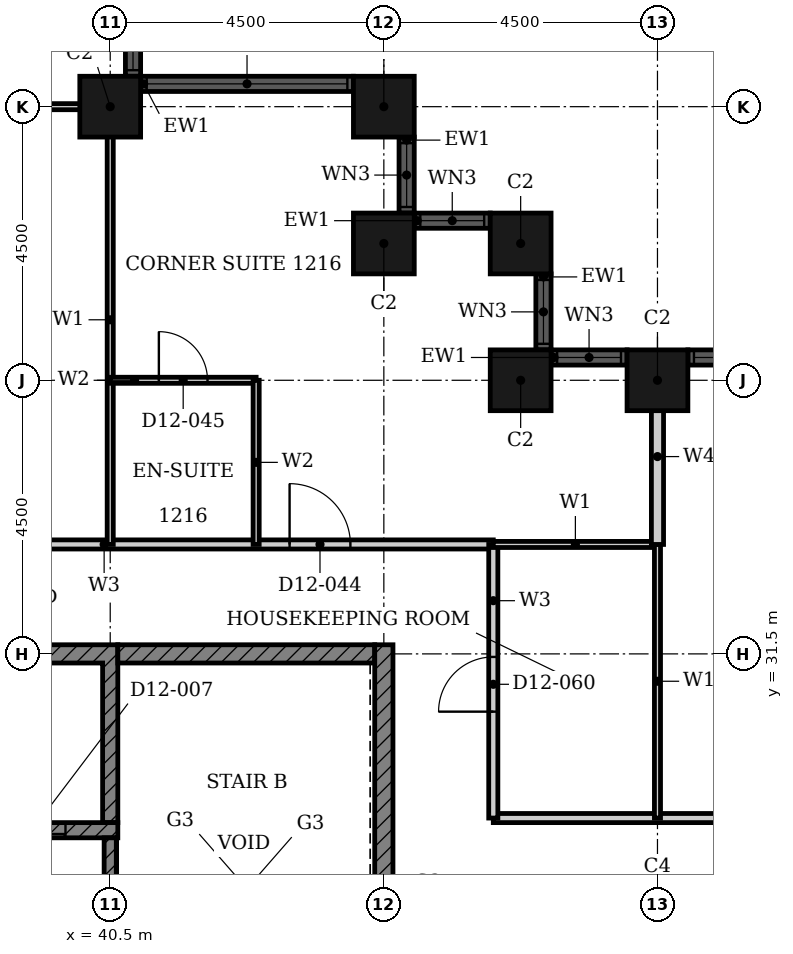
"""IFC4 building model, lengths in metres.
Left out: names, types, materials, properties, quantities, classifications, styles, units other than length and angle.
Written with IfcOpenShell. Run it as: python <this file> out.ifc"""

import sys

from ifc_helpers import new_model, si_unit, direction, frame, frame_2d, origin, origin_2d, place, context, subcontext, project, spatial, polyline, rectangle, hollow_rectangle, outline, extrude, element, fill, save


model = new_model("IFC4")
c1 = context("Model", 3, precision=1e-05, world=origin(), true_north=direction((0.0, 1.0)))
c2 = subcontext(c1, "Body", "Model", "MODEL_VIEW")
j1 = project(units=[si_unit("LENGTHUNIT", "METRE"), si_unit("PLANEANGLEUNIT", "RADIAN")], contexts=[c1])
p1 = place(None, origin())
s1 = spatial("IfcSite", under=j1, at=p1, CompositionType="ELEMENT")
p2 = place(p1, origin())
s2 = spatial("IfcBuilding", under=s1, at=p2, CompositionType="ELEMENT")
p3 = place(p2, frame((0.0, 0.0, 56.4)))
s3 = spatial("IfcBuildingStorey", under=s2, at=p3, CompositionType="ELEMENT", Elevation=56.4)
for number, where, z_axis, x_axis in (
    (1, (49.5, 36.0, 0.0), (0.0, 0.0, 1.0), (1.0, 0.0, 0.0)),
    (2, (47.25, 36.0, 0.0), (0.0, 0.0, 1.0), (1.0, 0.0, 0.0)),
    (3, (47.25, 38.25, 0.0), (0.0, 0.0, 1.0), (1.0, 0.0, 0.0)),
    (4, (45.0, 38.25, 0.0), (0.0, 0.0, 1.0), (1.0, 0.0, 0.0)),
    (5, (45.0, 40.5, 0.0), (0.0, 0.0, 1.0), (1.0, 0.0, 0.0)),
    (6, (40.5, 40.5, 0.0), (0.0, 0.0, 1.0), (1.0, 0.0, 0.0)),
):
    element("IfcColumn", number, at=place(p3, frame(where, z_axis=z_axis, x_axis=x_axis)), inside=s3, PredefinedType="COLUMN", context=c2, shape_type="SweptSolid", body=[
        extrude(hollow_rectangle(XDim=1.0, YDim=1.0, WallThickness=0.032, at=origin_2d()), origin(), (0.0, 0.0, 1.0), 3.6),
    ])
p4 = place(p3, frame((58.0, 36.375, 0.0), z_axis=(0.0, 0.0, 1.0), x_axis=(-1.0, 0.0, 0.0)))
e7 = element("IfcWall", 7, at=p4, inside=s3, PredefinedType="SOLIDWALL", context=c2, shape_type="SweptSolid", body=[
    extrude(rectangle(XDim=8.0, YDim=0.25, at=frame_2d((4.0, 0.0))), origin(), (0.0, 0.0, 1.0), 3.6),
])
p5 = place(p4, frame((0.1, 0.0, 0.9)))
e8 = element("IfcOpeningElement", 8, at=p5, cuts=e7, PredefinedType="OPENING", context=c2, shape_type="SweptSolid", body=[
    extrude(rectangle(XDim=3.3, YDim=2.08, at=frame_2d((1.65, 1.04))), frame((0.0, 0.135, 0.0), z_axis=(0.0, -1.0, 0.0), x_axis=(1.0, 0.0, 0.0)), (0.0, 0.0, 1.0), 0.27),
])
p6 = place(p4, frame((4.6, 0.0, 0.9)))
e9 = element("IfcOpeningElement", 9, at=p6, cuts=e7, PredefinedType="OPENING", context=c2, shape_type="SweptSolid", body=[
    extrude(rectangle(XDim=3.3, YDim=2.08, at=frame_2d((1.65, 1.04))), frame((0.0, 0.135, 0.0), z_axis=(0.0, -1.0, 0.0), x_axis=(1.0, 0.0, 0.0)), (0.0, 0.0, 1.0), 0.27),
])
p7 = place(p3, frame((49.0, 36.375, 0.0), z_axis=(0.0, 0.0, 1.0), x_axis=(-1.0, 0.0, 0.0)))
e10 = element("IfcWall", 10, at=p7, inside=s3, PredefinedType="SOLIDWALL", context=c2, shape_type="SweptSolid", body=[
    extrude(rectangle(XDim=1.25, YDim=0.25, at=frame_2d((0.625, 0.0))), origin(), (0.0, 0.0, 1.0), 3.6),
])
p8 = place(p7, frame((0.1, 0.0, 0.9)))
e11 = element("IfcOpeningElement", 11, at=p8, cuts=e10, PredefinedType="OPENING", context=c2, shape_type="SweptSolid", body=[
    extrude(rectangle(XDim=1.05, YDim=2.08, at=frame_2d((0.525, 1.04))), frame((0.0, 0.135, 0.0), z_axis=(0.0, -1.0, 0.0), x_axis=(1.0, 0.0, 0.0)), (0.0, 0.0, 1.0), 0.27),
])
p9 = place(p3, frame((47.625, 36.5, 0.0), z_axis=(0.0, 0.0, 1.0), x_axis=(0.0, 1.0, 0.0)))
e12 = element("IfcWall", 12, at=p9, inside=s3, PredefinedType="SOLIDWALL", context=c2, shape_type="SweptSolid", body=[
    extrude(rectangle(XDim=1.25, YDim=0.25, at=frame_2d((0.625, 0.0))), origin(), (0.0, 0.0, 1.0), 3.6),
])
p10 = place(p9, frame((0.1, 0.0, 0.9)))
e13 = element("IfcOpeningElement", 13, at=p10, cuts=e12, PredefinedType="OPENING", context=c2, shape_type="SweptSolid", body=[
    extrude(rectangle(XDim=1.05, YDim=2.08, at=frame_2d((0.525, 1.04))), frame((0.0, 0.135, 0.0), z_axis=(0.0, -1.0, 0.0), x_axis=(1.0, 0.0, 0.0)), (0.0, 0.0, 1.0), 0.27),
])
p11 = place(p3, frame((46.75, 38.625, 0.0), z_axis=(0.0, 0.0, 1.0), x_axis=(-1.0, 0.0, 0.0)))
e14 = element("IfcWall", 14, at=p11, inside=s3, PredefinedType="SOLIDWALL", context=c2, shape_type="SweptSolid", body=[
    extrude(rectangle(XDim=1.25, YDim=0.25, at=frame_2d((0.625, 0.0))), origin(), (0.0, 0.0, 1.0), 3.6),
])
p12 = place(p11, frame((0.1, 0.0, 0.9)))
e15 = element("IfcOpeningElement", 15, at=p12, cuts=e14, PredefinedType="OPENING", context=c2, shape_type="SweptSolid", body=[
    extrude(rectangle(XDim=1.05, YDim=2.08, at=frame_2d((0.525, 1.04))), frame((0.0, 0.135, 0.0), z_axis=(0.0, -1.0, 0.0), x_axis=(1.0, 0.0, 0.0)), (0.0, 0.0, 1.0), 0.27),
])
p13 = place(p3, frame((45.375, 38.75, 0.0), z_axis=(0.0, 0.0, 1.0), x_axis=(0.0, 1.0, 0.0)))
e16 = element("IfcWall", 16, at=p13, inside=s3, PredefinedType="SOLIDWALL", context=c2, shape_type="SweptSolid", body=[
    extrude(rectangle(XDim=1.25, YDim=0.25, at=frame_2d((0.625, 0.0))), origin(), (0.0, 0.0, 1.0), 3.6),
])
p14 = place(p13, frame((0.1, 0.0, 0.9)))
e17 = element("IfcOpeningElement", 17, at=p14, cuts=e16, PredefinedType="OPENING", context=c2, shape_type="SweptSolid", body=[
    extrude(rectangle(XDim=1.05, YDim=2.08, at=frame_2d((0.525, 1.04))), frame((0.0, 0.135, 0.0), z_axis=(0.0, -1.0, 0.0), x_axis=(1.0, 0.0, 0.0)), (0.0, 0.0, 1.0), 0.27),
])
p15 = place(p3, frame((44.5, 40.875, 0.0), z_axis=(0.0, 0.0, 1.0), x_axis=(-1.0, 0.0, 0.0)))
e18 = element("IfcWall", 18, at=p15, inside=s3, PredefinedType="SOLIDWALL", context=c2, shape_type="SweptSolid", body=[
    extrude(rectangle(XDim=3.5, YDim=0.25, at=frame_2d((1.75, 0.0))), origin(), (0.0, 0.0, 1.0), 3.6),
])
p16 = place(p15, frame((0.1, 0.0, 0.9)))
e19 = element("IfcOpeningElement", 19, at=p16, cuts=e18, PredefinedType="OPENING", context=c2, shape_type="SweptSolid", body=[
    extrude(rectangle(XDim=3.3, YDim=2.08, at=frame_2d((1.65, 1.04))), frame((0.0, 0.135, 0.0), z_axis=(0.0, -1.0, 0.0), x_axis=(1.0, 0.0, 0.0)), (0.0, 0.0, 1.0), 0.27),
])
p17 = place(p3, frame((40.875, 41.0, 0.0), z_axis=(0.0, 0.0, 1.0), x_axis=(0.0, 1.0, 0.0)))
e20 = element("IfcWall", 20, at=p17, inside=s3, PredefinedType="SOLIDWALL", context=c2, shape_type="SweptSolid", body=[
    extrude(rectangle(XDim=8.0, YDim=0.25, at=frame_2d((4.0, 0.0))), origin(), (0.0, 0.0, 1.0), 3.6),
])
p18 = place(p17, frame((0.1, 0.0, 0.9)))
e21 = element("IfcOpeningElement", 21, at=p18, cuts=e20, PredefinedType="OPENING", context=c2, shape_type="SweptSolid", body=[
    extrude(rectangle(XDim=3.3, YDim=2.08, at=frame_2d((1.65, 1.04))), frame((0.0, 0.135, 0.0), z_axis=(0.0, -1.0, 0.0), x_axis=(1.0, 0.0, 0.0)), (0.0, 0.0, 1.0), 0.27),
])
p19 = place(p17, frame((4.6, 0.0, 0.9)))
e22 = element("IfcOpeningElement", 22, at=p19, cuts=e20, PredefinedType="OPENING", context=c2, shape_type="SweptSolid", body=[
    extrude(rectangle(XDim=3.3, YDim=2.08, at=frame_2d((1.65, 1.04))), frame((0.0, 0.135, 0.0), z_axis=(0.0, -1.0, 0.0), x_axis=(1.0, 0.0, 0.0)), (0.0, 0.0, 1.0), 0.27),
])
p20 = place(p3, origin())
e23 = element("IfcWall", 23, at=p20, inside=s3, PredefinedType="SHEAR", context=c2, shape_type="SweptSolid", body=[
    extrude(outline(polyline([(24.947, 28.725), (25.197, 28.725), (25.197, 31.35), (27.518, 31.35), (27.518, 28.725), (27.768, 28.725), (27.768, 31.35), (30.089, 31.35), (30.089, 28.725), (30.339, 28.725), (30.339, 31.35), (32.661, 31.35), (32.661, 28.725), (32.911, 28.725), (32.911, 31.35), (35.232, 31.35), (35.232, 28.725), (35.482, 28.725), (35.482, 31.35), (37.803, 31.35), (37.803, 28.725), (38.053, 28.725), (38.053, 31.35), (40.375, 31.35), (40.375, 28.725), (40.625, 28.725), (40.625, 31.65), (24.947, 31.65), (24.947, 28.725)])), origin(), (0.0, 0.0, 1.0), 3.3),
])
p21 = place(p3, frame((40.625, 31.5, 0.0), z_axis=(0.0, 0.0, 1.0), x_axis=(1.0, 0.0, 0.0)))
e24 = element("IfcWall", 24, at=p21, inside=s3, PredefinedType="SHEAR", context=c2, shape_type="SweptSolid", body=[
    extrude(rectangle(XDim=4.225, YDim=0.3, at=frame_2d((2.113, 0.0))), origin(), (0.0, 0.0, 1.0), 3.3),
])
p22 = place(p3, frame((45.0, 22.35, 0.0), z_axis=(0.0, 0.0, 1.0), x_axis=(0.0, 1.0, 0.0)))
e25 = element("IfcWall", 25, at=p22, inside=s3, PredefinedType="SHEAR", context=c2, shape_type="SweptSolid", body=[
    extrude(rectangle(XDim=9.3, YDim=0.3, at=frame_2d((4.65, 0.0))), origin(), (0.0, 0.0, 1.0), 3.3),
])
p23 = place(p3, frame((24.947, 28.6, 0.0), z_axis=(0.0, 0.0, 1.0), x_axis=(1.0, 0.0, 0.0)))
e26 = element("IfcWall", 26, at=p23, inside=s3, PredefinedType="SHEAR", context=c2, shape_type="SweptSolid", body=[
    extrude(rectangle(XDim=15.678, YDim=0.25, at=frame_2d((7.839, 0.0))), origin(), (0.0, 0.0, 1.0), 3.3),
])
p24 = place(p23, frame((0.861, 0.0, 0.0)))
e27 = element("IfcOpeningElement", 27, at=p24, cuts=e26, PredefinedType="OPENING", context=c2, shape_type="SweptSolid", body=[
    extrude(rectangle(XDim=1.1, YDim=2.1, at=frame_2d((0.55, 1.05))), frame((0.0, 0.135, 0.0), z_axis=(0.0, -1.0, 0.0), x_axis=(1.0, 0.0, 0.0)), (0.0, 0.0, 1.0), 0.27),
])
p25 = place(p23, frame((8.575, 0.0, 0.0)))
e28 = element("IfcOpeningElement", 28, at=p25, cuts=e26, PredefinedType="OPENING", context=c2, shape_type="SweptSolid", body=[
    extrude(rectangle(XDim=1.1, YDim=2.1, at=frame_2d((0.55, 1.05))), frame((0.0, 0.135, 0.0), z_axis=(0.0, -1.0, 0.0), x_axis=(1.0, 0.0, 0.0)), (0.0, 0.0, 1.0), 0.27),
])
p26 = place(p23, frame((13.718, 0.0, 0.0)))
e29 = element("IfcOpeningElement", 29, at=p26, cuts=e26, PredefinedType="OPENING", context=c2, shape_type="SweptSolid", body=[
    extrude(rectangle(XDim=1.1, YDim=2.1, at=frame_2d((0.55, 1.05))), frame((0.0, 0.135, 0.0), z_axis=(0.0, -1.0, 0.0), x_axis=(1.0, 0.0, 0.0)), (0.0, 0.0, 1.0), 0.27),
])
p27 = place(p3, frame((40.5, 22.65, 0.0), z_axis=(0.0, 0.0, 1.0), x_axis=(0.0, 1.0, 0.0)))
e30 = element("IfcWall", 30, at=p27, inside=s3, PredefinedType="SHEAR", context=c2, shape_type="SweptSolid", body=[
    extrude(rectangle(XDim=5.825, YDim=0.2, at=frame_2d((2.913, 0.0))), origin(), (0.0, 0.0, 1.0), 3.3),
])
p28 = place(p27, frame((0.25, 0.0, 0.0)))
e31 = element("IfcOpeningElement", 31, at=p28, cuts=e30, PredefinedType="OPENING", context=c2, shape_type="SweptSolid", body=[
    extrude(rectangle(XDim=1.8, YDim=2.1, at=frame_2d((0.9, 1.05))), frame((0.0, 0.11, 0.0), z_axis=(0.0, -1.0, 0.0), x_axis=(1.0, 0.0, 0.0)), (0.0, 0.0, 1.0), 0.22),
])
p29 = place(p3, frame((46.8, 28.8, 0.0), z_axis=(0.0, 0.0, 1.0), x_axis=(1.0, 0.0, 0.0)))
e32 = element("IfcWall", 32, at=p29, inside=s3, PredefinedType="PARTITIONING", context=c2, shape_type="SweptSolid", body=[
    extrude(rectangle(XDim=11.7, YDim=0.15, at=frame_2d((5.85, 0.0))), origin(), (0.0, 0.0, 1.0), 3.3),
])
p30 = place(p29, frame((4.45, 0.0, 0.0)))
e33 = element("IfcOpeningElement", 33, at=p30, cuts=e32, PredefinedType="OPENING", context=c2, shape_type="SweptSolid", body=[
    extrude(rectangle(XDim=1.0, YDim=2.1, at=frame_2d((0.5, 1.05))), frame((0.0, 0.085, 0.0), z_axis=(0.0, -1.0, 0.0), x_axis=(1.0, 0.0, 0.0)), (0.0, 0.0, 1.0), 0.17),
])
p31 = place(p3, frame((33.3, 33.3, 0.0), z_axis=(0.0, 0.0, 1.0), x_axis=(1.0, 0.0, 0.0)))
e34 = element("IfcWall", 34, at=p31, inside=s3, PredefinedType="PARTITIONING", context=c2, shape_type="SweptSolid", body=[
    extrude(rectangle(XDim=13.5, YDim=0.15, at=frame_2d((6.75, 0.0))), origin(), (0.0, 0.0, 1.0), 3.3),
])
p32 = place(p31, frame((10.15, 0.0, 0.0)))
e35 = element("IfcOpeningElement", 35, at=p32, cuts=e34, PredefinedType="OPENING", context=c2, shape_type="SweptSolid", body=[
    extrude(rectangle(XDim=1.0, YDim=2.1, at=frame_2d((0.5, 1.05))), frame((0.0, 0.085, 0.0), z_axis=(0.0, -1.0, 0.0), x_axis=(1.0, 0.0, 0.0)), (0.0, 0.0, 1.0), 0.17),
])
p33 = place(p31, frame((3.15, 0.0, 0.0)))
e36 = element("IfcOpeningElement", 36, at=p33, cuts=e34, PredefinedType="OPENING", context=c2, shape_type="SweptSolid", body=[
    extrude(rectangle(XDim=0.9, YDim=2.1, at=frame_2d((0.45, 1.05))), frame((0.0, 0.085, 0.0), z_axis=(0.0, -1.0, 0.0), x_axis=(1.0, 0.0, 0.0)), (0.0, 0.0, 1.0), 0.17),
])
p34 = place(p3, frame((46.8, 28.8, 0.0), z_axis=(0.0, 0.0, 1.0), x_axis=(0.0, 1.0, 0.0)))
e37 = element("IfcWall", 37, at=p34, inside=s3, PredefinedType="PARTITIONING", context=c2, shape_type="SweptSolid", body=[
    extrude(rectangle(XDim=4.5, YDim=0.15, at=frame_2d((2.25, 0.0))), origin(), (0.0, 0.0, 1.0), 3.3),
])
p35 = place(p34, frame((1.75, 0.0, 0.0)))
e38 = element("IfcOpeningElement", 38, at=p35, cuts=e37, PredefinedType="OPENING", context=c2, shape_type="SweptSolid", body=[
    extrude(rectangle(XDim=0.9, YDim=2.1, at=frame_2d((0.45, 1.05))), frame((0.0, 0.085, 0.0), z_axis=(0.0, -1.0, 0.0), x_axis=(1.0, 0.0, 0.0)), (0.0, 0.0, 1.0), 0.17),
])
p36 = place(p3, frame((46.8, 33.3, 0.0), z_axis=(0.0, 0.0, 1.0), x_axis=(1.0, 0.0, 0.0)))
e39 = element("IfcWall", 39, at=p36, inside=s3, PredefinedType="PARTITIONING", context=c2, shape_type="SweptSolid", body=[
    extrude(rectangle(XDim=2.7, YDim=0.1, at=frame_2d((1.35, 0.0))), origin(), (0.0, 0.0, 1.0), 3.3),
])
p37 = place(p3, frame((33.3, 40.5, 0.0), z_axis=(0.0, 0.0, 1.0), x_axis=(1.0, 0.0, 0.0)))
e40 = element("IfcWall", 40, at=p37, inside=s3, PredefinedType="PARTITIONING", context=c2, shape_type="SweptSolid", body=[
    extrude(rectangle(XDim=7.39, YDim=0.1, at=frame_2d((3.695, 0.0))), origin(), (0.0, 0.0, 1.0), 2.38),
])
p38 = place(p3, frame((40.5, 33.3, 0.0), z_axis=(0.0, 0.0, 1.0), x_axis=(0.0, 1.0, 0.0)))
e41 = element("IfcWall", 41, at=p38, inside=s3, PredefinedType="PARTITIONING", context=c2, shape_type="SweptSolid", body=[
    extrude(rectangle(XDim=7.39, YDim=0.1, at=frame_2d((3.695, 0.0))), origin(), (0.0, 0.0, 1.0), 3.3),
])
p39 = place(p3, frame((49.5, 28.8, 0.0), z_axis=(0.0, 0.0, 1.0), x_axis=(0.0, 1.0, 0.0)))
e42 = element("IfcWall", 42, at=p39, inside=s3, PredefinedType="PARTITIONING", context=c2, shape_type="SweptSolid", body=[
    extrude(rectangle(XDim=4.5, YDim=0.1, at=frame_2d((2.25, 0.0))), origin(), (0.0, 0.0, 1.0), 2.38),
])
p40 = place(p3, frame((49.5, 33.3, 0.0), z_axis=(0.0, 0.0, 1.0), x_axis=(0.0, 1.0, 0.0)))
e43 = element("IfcWall", 43, at=p40, inside=s3, PredefinedType="PARTITIONING", context=c2, shape_type="SweptSolid", body=[
    extrude(rectangle(XDim=2.89, YDim=0.2, at=frame_2d((1.445, 0.0))), origin(), (0.0, 0.0, 1.0), 2.38),
])
p41 = place(p3, frame((40.5, 36.0, 0.0), z_axis=(0.0, 0.0, 1.0), x_axis=(1.0, 0.0, 0.0)))
e44 = element("IfcWall", 44, at=p41, inside=s3, PredefinedType="PARTITIONING", context=c2, shape_type="SweptSolid", body=[
    extrude(rectangle(XDim=2.4, YDim=0.1, at=frame_2d((1.2, 0.0))), origin(), (0.0, 0.0, 1.0), 3.3),
])
p42 = place(p41, frame((0.8, 0.0, 0.0)))
e45 = element("IfcOpeningElement", 45, at=p42, cuts=e44, PredefinedType="OPENING", context=c2, shape_type="SweptSolid", body=[
    extrude(rectangle(XDim=0.8, YDim=2.1, at=frame_2d((0.4, 1.05))), frame((0.0, 0.06, 0.0), z_axis=(0.0, -1.0, 0.0), x_axis=(1.0, 0.0, 0.0)), (0.0, 0.0, 1.0), 0.12),
])
p43 = place(p3, frame((42.9, 33.3, 0.0), z_axis=(0.0, 0.0, 1.0), x_axis=(0.0, 1.0, 0.0)))
e46 = element("IfcWall", 46, at=p43, inside=s3, PredefinedType="PARTITIONING", context=c2, shape_type="SweptSolid", body=[
    extrude(rectangle(XDim=2.7, YDim=0.1, at=frame_2d((1.35, 0.0))), origin(), (0.0, 0.0, 1.0), 3.3),
])
p44 = place(p6, origin())
e47 = element("IfcWindow", 47, at=p44, inside=s3, PartitioningType="SINGLE_PANEL", PredefinedType="WINDOW", context=c2, shape_type="SweptSolid", body=[
    extrude(rectangle(XDim=3.3, YDim=2.08, at=frame_2d((1.65, 1.04))), frame((0.0, 0.03, 0.0), z_axis=(0.0, -1.0, 0.0), x_axis=(1.0, 0.0, 0.0)), (0.0, 0.0, 1.0), 0.06),
])
fill(e9, e47)
p45 = place(p8, origin())
e48 = element("IfcWindow", 48, at=p45, inside=s3, PartitioningType="SINGLE_PANEL", PredefinedType="WINDOW", context=c2, shape_type="SweptSolid", body=[
    extrude(rectangle(XDim=1.05, YDim=2.08, at=frame_2d((0.525, 1.04))), frame((0.0, 0.03, 0.0), z_axis=(0.0, -1.0, 0.0), x_axis=(1.0, 0.0, 0.0)), (0.0, 0.0, 1.0), 0.06),
])
fill(e11, e48)
p46 = place(p10, origin())
e49 = element("IfcWindow", 49, at=p46, inside=s3, PartitioningType="SINGLE_PANEL", PredefinedType="WINDOW", context=c2, shape_type="SweptSolid", body=[
    extrude(rectangle(XDim=1.05, YDim=2.08, at=frame_2d((0.525, 1.04))), frame((0.0, 0.03, 0.0), z_axis=(0.0, -1.0, 0.0), x_axis=(1.0, 0.0, 0.0)), (0.0, 0.0, 1.0), 0.06),
])
fill(e13, e49)
p47 = place(p12, origin())
e50 = element("IfcWindow", 50, at=p47, inside=s3, PartitioningType="SINGLE_PANEL", PredefinedType="WINDOW", context=c2, shape_type="SweptSolid", body=[
    extrude(rectangle(XDim=1.05, YDim=2.08, at=frame_2d((0.525, 1.04))), frame((0.0, 0.03, 0.0), z_axis=(0.0, -1.0, 0.0), x_axis=(1.0, 0.0, 0.0)), (0.0, 0.0, 1.0), 0.06),
])
fill(e15, e50)
p48 = place(p14, origin())
e51 = element("IfcWindow", 51, at=p48, inside=s3, PartitioningType="SINGLE_PANEL", PredefinedType="WINDOW", context=c2, shape_type="SweptSolid", body=[
    extrude(rectangle(XDim=1.05, YDim=2.08, at=frame_2d((0.525, 1.04))), frame((0.0, 0.03, 0.0), z_axis=(0.0, -1.0, 0.0), x_axis=(1.0, 0.0, 0.0)), (0.0, 0.0, 1.0), 0.06),
])
fill(e17, e51)
p49 = place(p16, origin())
e52 = element("IfcWindow", 52, at=p49, inside=s3, PartitioningType="SINGLE_PANEL", PredefinedType="WINDOW", context=c2, shape_type="SweptSolid", body=[
    extrude(rectangle(XDim=3.3, YDim=2.08, at=frame_2d((1.65, 1.04))), frame((0.0, 0.03, 0.0), z_axis=(0.0, -1.0, 0.0), x_axis=(1.0, 0.0, 0.0)), (0.0, 0.0, 1.0), 0.06),
])
fill(e19, e52)
p50 = place(p18, origin())
e53 = element("IfcWindow", 53, at=p50, inside=s3, PartitioningType="SINGLE_PANEL", PredefinedType="WINDOW", context=c2, shape_type="SweptSolid", body=[
    extrude(rectangle(XDim=3.3, YDim=2.08, at=frame_2d((1.65, 1.04))), frame((0.0, 0.03, 0.0), z_axis=(0.0, -1.0, 0.0), x_axis=(1.0, 0.0, 0.0)), (0.0, 0.0, 1.0), 0.06),
])
fill(e21, e53)
p51 = place(p26, origin())
e54 = element("IfcDoor", 54, at=p51, inside=s3, OperationType="DOUBLE_DOOR_SLIDING", PredefinedType="DOOR", context=c2, shape_type="SweptSolid", body=[
    extrude(rectangle(XDim=1.1, YDim=2.1, at=frame_2d((0.55, 1.05))), frame((0.0, 0.025, 0.0), z_axis=(0.0, -1.0, 0.0), x_axis=(1.0, 0.0, 0.0)), (0.0, 0.0, 1.0), 0.05),
])
fill(e29, e54)
p52 = place(p32, origin())
e55 = element("IfcDoor", 55, at=p52, inside=s3, OperationType="SINGLE_SWING_RIGHT", PredefinedType="DOOR", context=c2, shape_type="SweptSolid", body=[
    extrude(rectangle(XDim=1.0, YDim=2.1, at=frame_2d((0.5, 1.05))), frame((0.0, 0.025, 0.0), z_axis=(0.0, -1.0, 0.0), x_axis=(1.0, 0.0, 0.0)), (0.0, 0.0, 1.0), 0.05),
])
fill(e35, e55)
p53 = place(p42, origin())
e56 = element("IfcDoor", 56, at=p53, inside=s3, OperationType="SINGLE_SWING_LEFT", PredefinedType="DOOR", context=c2, shape_type="SweptSolid", body=[
    extrude(rectangle(XDim=0.8, YDim=2.1, at=frame_2d((0.4, 1.05))), frame((0.0, 0.025, 0.0), z_axis=(0.0, -1.0, 0.0), x_axis=(1.0, 0.0, 0.0)), (0.0, 0.0, 1.0), 0.05),
])
fill(e45, e56)
p54 = place(p35, origin())
e57 = element("IfcDoor", 57, at=p54, inside=s3, OperationType="SINGLE_SWING_RIGHT", PredefinedType="DOOR", context=c2, shape_type="SweptSolid", body=[
    extrude(rectangle(XDim=0.9, YDim=2.1, at=frame_2d((0.45, 1.05))), frame((0.0, 0.025, 0.0), z_axis=(0.0, -1.0, 0.0), x_axis=(1.0, 0.0, 0.0)), (0.0, 0.0, 1.0), 0.05),
])
fill(e38, e57)
save(model, sys.argv[1])
